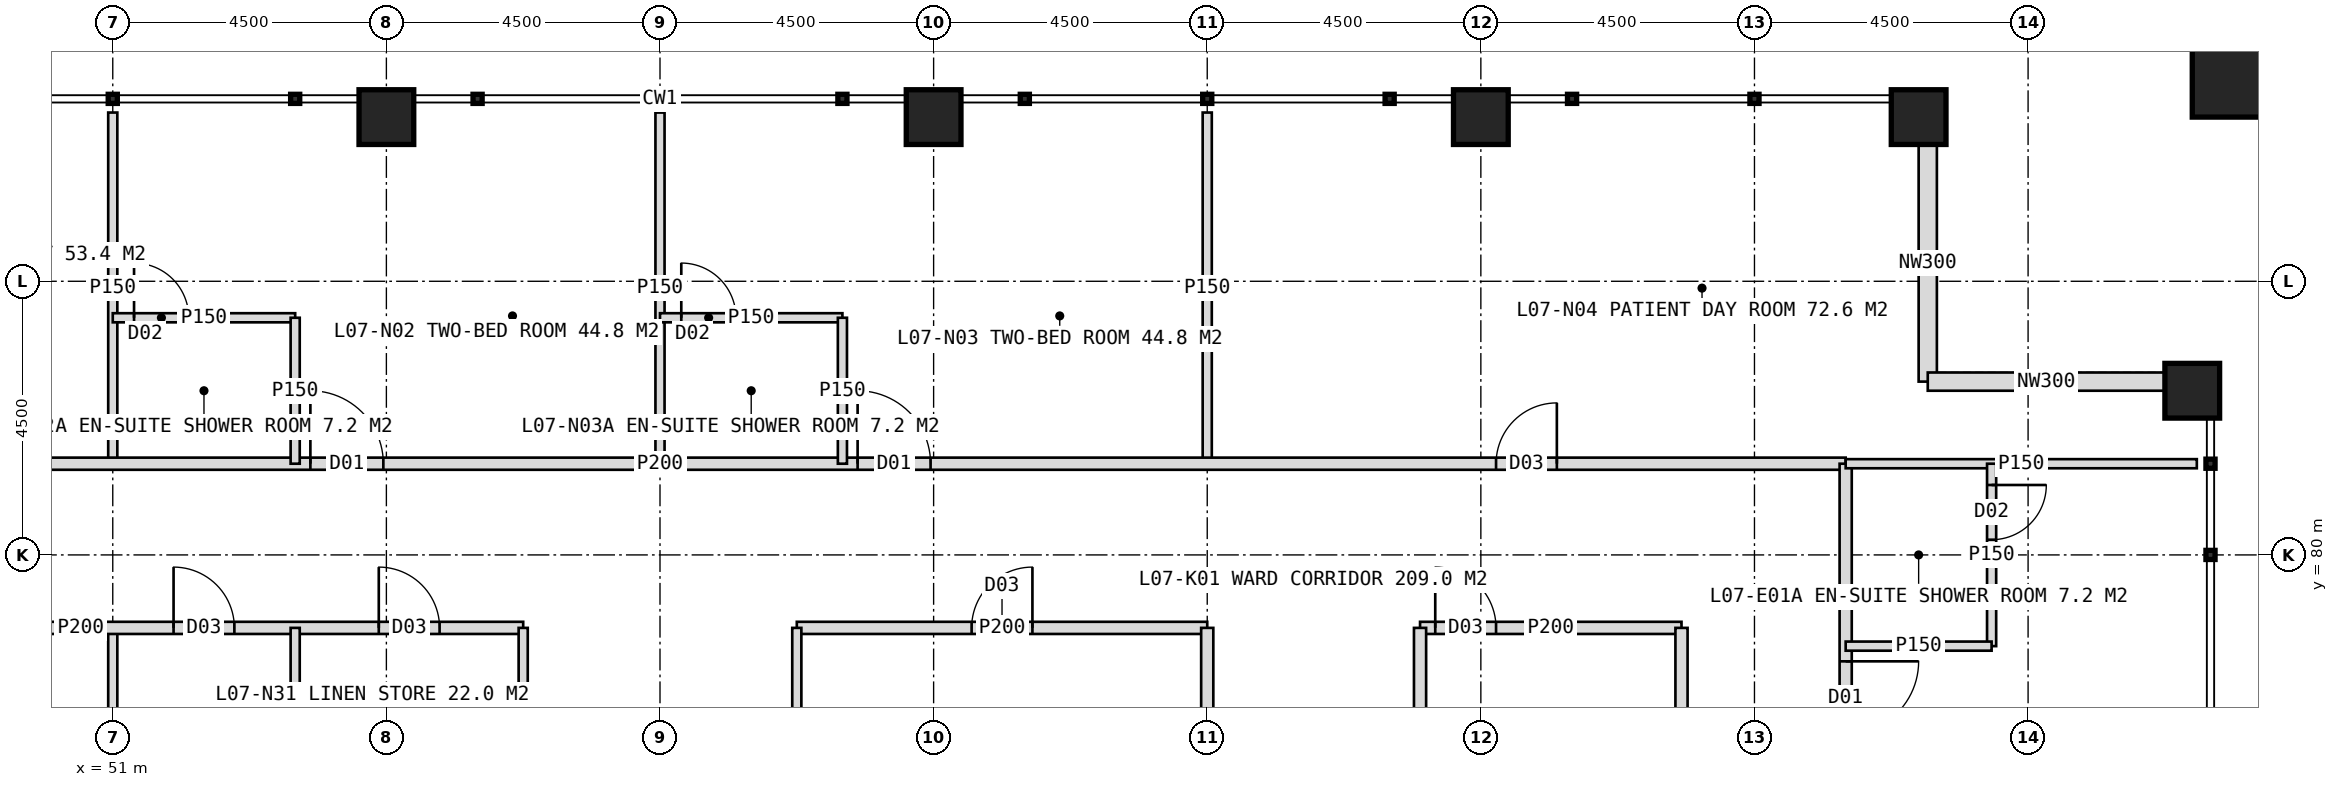
"""IFC4 building model, lengths in metres.
Left out: names, types, materials, properties, quantities, classifications, styles, units other than length and angle.
Written with IfcOpenShell. Run it as: python <this file> out.ifc"""

import sys

from ifc_helpers import new_model, si_unit, direction, frame, frame_2d, origin, origin_2d, place, context, subcontext, project, spatial, rectangle, hollow_rectangle, extrude, element, fill, save


model = new_model("IFC4")
c1 = context("Model", 3, precision=1e-05, world=origin(), true_north=direction((0.0, 1.0)))
c2 = subcontext(c1, "Body", "Model", "MODEL_VIEW")
j1 = project(units=[si_unit("LENGTHUNIT", "METRE"), si_unit("PLANEANGLEUNIT", "RADIAN")], contexts=[c1])
p1 = place(None, origin())
s1 = spatial("IfcSite", under=j1, at=p1, CompositionType="ELEMENT")
p2 = place(p1, origin())
s2 = spatial("IfcBuilding", under=s1, at=p2, CompositionType="ELEMENT")
p3 = place(p2, frame((0.0, 0.0, 35.0)))
s3 = spatial("IfcBuildingStorey", under=s2, at=p3, CompositionType="ELEMENT", Elevation=35.0)
for number, where, z_axis, x_axis in (
    (1, (55.5, 87.2, 0.0), (0.0, 0.0, 1.0), (1.0, 0.0, 0.0)),
    (2, (64.5, 87.2, 0.0), (0.0, 0.0, 1.0), (1.0, 0.0, 0.0)),
    (3, (73.5, 87.2, 0.0), (0.0, 0.0, 1.0), (1.0, 0.0, 0.0)),
    (4, (80.7, 87.2, 0.0), (0.0, 0.0, 1.0), (1.0, 0.0, 0.0)),
    (5, (85.2, 82.7, 0.0), (0.0, 0.0, 1.0), (1.0, 0.0, 0.0)),
):
    element("IfcColumn", number, at=place(p3, frame(where, z_axis=z_axis, x_axis=x_axis)), inside=s3, PredefinedType="COLUMN", context=c2, shape_type="SweptSolid", body=[
        extrude(hollow_rectangle(XDim=0.9, YDim=0.9, WallThickness=0.08, at=origin_2d()), origin(), (0.0, 0.0, 1.0), 4.0),
    ])
p4 = place(p3, frame((86.1, 88.1, 0.0), z_axis=(0.0, 0.0, 1.0), x_axis=(1.0, 0.0, 0.0)))
e6 = element("IfcColumn", 6, at=p4, inside=s3, PredefinedType="COLUMN", context=c2, shape_type="SweptSolid", body=[
    extrude(hollow_rectangle(XDim=1.8, YDim=1.8, WallThickness=0.1, at=origin_2d()), origin(), (0.0, 0.0, 1.0), 4.0),
])
for number, where, z_axis, x_axis in (
    (7, (80.85, 86.75, 0.0), (0.0, 0.0, 1.0), (0.0, -1.0, 0.0)),
    (8, (80.85, 82.85, 0.0), (0.0, 0.0, 1.0), (1.0, 0.0, 0.0)),
):
    element("IfcWall", number, at=place(p3, frame(where, z_axis=z_axis, x_axis=x_axis)), inside=s3, PredefinedType="ELEMENTEDWALL", context=c2, shape_type="SweptSolid", body=[
        extrude(rectangle(XDim=3.9, YDim=0.3, at=frame_2d((1.95, 0.0))), origin(), (0.0, 0.0, 1.0), 2.95),
    ])
p5 = place(p3, frame((51.0, 81.5, 0.0), z_axis=(0.0, 0.0, 1.0), x_axis=(0.0, 1.0, 0.0)))
e9 = element("IfcWall", 9, at=p5, inside=s3, PredefinedType="PARTITIONING", context=c2, shape_type="SweptSolid", body=[
    extrude(rectangle(XDim=5.775, YDim=0.15, at=frame_2d((2.887, 0.0))), origin(), (0.0, 0.0, 1.0), 3.75),
])
p6 = place(p3, frame((60.0, 81.5, 0.0), z_axis=(0.0, 0.0, 1.0), x_axis=(0.0, 1.0, 0.0)))
e10 = element("IfcWall", 10, at=p6, inside=s3, PredefinedType="PARTITIONING", context=c2, shape_type="SweptSolid", body=[
    extrude(rectangle(XDim=5.775, YDim=0.15, at=frame_2d((2.887, 0.0))), origin(), (0.0, 0.0, 1.0), 2.75),
])
p7 = place(p3, frame((69.0, 81.5, 0.0), z_axis=(0.0, 0.0, 1.0), x_axis=(0.0, 1.0, 0.0)))
e11 = element("IfcWall", 11, at=p7, inside=s3, PredefinedType="PARTITIONING", context=c2, shape_type="SweptSolid", body=[
    extrude(rectangle(XDim=5.775, YDim=0.15, at=frame_2d((2.887, 0.0))), origin(), (0.0, 0.0, 1.0), 3.75),
])
p8 = place(p3, frame((40.5, 81.5, 0.0), z_axis=(0.0, 0.0, 1.0), x_axis=(1.0, 0.0, 0.0)))
e12 = element("IfcWall", 12, at=p8, inside=s3, PredefinedType="PARTITIONING", context=c2, shape_type="SweptSolid", body=[
    extrude(rectangle(XDim=39.0, YDim=0.2, at=frame_2d((19.5, 0.0))), origin(), (0.0, 0.0, 1.0), 3.75),
])
p9 = place(p8, frame((3.25, 0.0, 0.0)))
e13 = element("IfcOpeningElement", 13, at=p9, cuts=e12, PredefinedType="OPENING", context=c2, shape_type="SweptSolid", body=[
    extrude(rectangle(XDim=1.2, YDim=2.2, at=frame_2d((0.6, 1.1))), frame((0.0, 0.11, 0.0), z_axis=(0.0, -1.0, 0.0), x_axis=(1.0, 0.0, 0.0)), (0.0, 0.0, 1.0), 0.22),
])
p10 = place(p8, frame((13.75, 0.0, 0.0)))
e14 = element("IfcOpeningElement", 14, at=p10, cuts=e12, PredefinedType="OPENING", context=c2, shape_type="SweptSolid", body=[
    extrude(rectangle(XDim=1.2, YDim=2.2, at=frame_2d((0.6, 1.1))), frame((0.0, 0.11, 0.0), z_axis=(0.0, -1.0, 0.0), x_axis=(1.0, 0.0, 0.0)), (0.0, 0.0, 1.0), 0.22),
])
p11 = place(p8, frame((22.75, 0.0, 0.0)))
e15 = element("IfcOpeningElement", 15, at=p11, cuts=e12, PredefinedType="OPENING", context=c2, shape_type="SweptSolid", body=[
    extrude(rectangle(XDim=1.2, YDim=2.2, at=frame_2d((0.6, 1.1))), frame((0.0, 0.11, 0.0), z_axis=(0.0, -1.0, 0.0), x_axis=(1.0, 0.0, 0.0)), (0.0, 0.0, 1.0), 0.22),
])
p12 = place(p8, frame((33.25, 0.0, 0.0)))
e16 = element("IfcOpeningElement", 16, at=p12, cuts=e12, PredefinedType="OPENING", context=c2, shape_type="SweptSolid", body=[
    extrude(rectangle(XDim=1.0, YDim=2.1, at=frame_2d((0.5, 1.05))), frame((0.0, 0.11, 0.0), z_axis=(0.0, -1.0, 0.0), x_axis=(1.0, 0.0, 0.0)), (0.0, 0.0, 1.0), 0.22),
])
p13 = place(p3, frame((51.0, 83.9, 0.0), z_axis=(0.0, 0.0, 1.0), x_axis=(1.0, 0.0, 0.0)))
e17 = element("IfcWall", 17, at=p13, inside=s3, PredefinedType="PARTITIONING", context=c2, shape_type="SweptSolid", body=[
    extrude(rectangle(XDim=3.0, YDim=0.15, at=frame_2d((1.5, 0.0))), origin(), (0.0, 0.0, 1.0), 3.75),
])
p14 = place(p13, frame((0.35, 0.0, 0.0)))
e18 = element("IfcOpeningElement", 18, at=p14, cuts=e17, PredefinedType="OPENING", context=c2, shape_type="SweptSolid", body=[
    extrude(rectangle(XDim=0.9, YDim=2.1, at=frame_2d((0.45, 1.05))), frame((0.0, 0.085, 0.0), z_axis=(0.0, -1.0, 0.0), x_axis=(1.0, 0.0, 0.0)), (0.0, 0.0, 1.0), 0.17),
])
p15 = place(p3, frame((54.0, 81.5, 0.0), z_axis=(0.0, 0.0, 1.0), x_axis=(0.0, 1.0, 0.0)))
e19 = element("IfcWall", 19, at=p15, inside=s3, PredefinedType="PARTITIONING", context=c2, shape_type="SweptSolid", body=[
    extrude(rectangle(XDim=2.4, YDim=0.15, at=frame_2d((1.2, 0.0))), origin(), (0.0, 0.0, 1.0), 3.75),
])
p16 = place(p3, frame((60.0, 83.9, 0.0), z_axis=(0.0, 0.0, 1.0), x_axis=(1.0, 0.0, 0.0)))
e20 = element("IfcWall", 20, at=p16, inside=s3, PredefinedType="PARTITIONING", context=c2, shape_type="SweptSolid", body=[
    extrude(rectangle(XDim=3.0, YDim=0.15, at=frame_2d((1.5, 0.0))), origin(), (0.0, 0.0, 1.0), 3.75),
])
p17 = place(p16, frame((0.35, 0.0, 0.0)))
e21 = element("IfcOpeningElement", 21, at=p17, cuts=e20, PredefinedType="OPENING", context=c2, shape_type="SweptSolid", body=[
    extrude(rectangle(XDim=0.9, YDim=2.1, at=frame_2d((0.45, 1.05))), frame((0.0, 0.085, 0.0), z_axis=(0.0, -1.0, 0.0), x_axis=(1.0, 0.0, 0.0)), (0.0, 0.0, 1.0), 0.17),
])
p18 = place(p3, frame((63.0, 81.5, 0.0), z_axis=(0.0, 0.0, 1.0), x_axis=(0.0, 1.0, 0.0)))
e22 = element("IfcWall", 22, at=p18, inside=s3, PredefinedType="PARTITIONING", context=c2, shape_type="SweptSolid", body=[
    extrude(rectangle(XDim=2.4, YDim=0.15, at=frame_2d((1.2, 0.0))), origin(), (0.0, 0.0, 1.0), 3.75),
])
p19 = place(p3, frame((51.0, 71.0, 0.0), z_axis=(0.0, 0.0, 1.0), x_axis=(0.0, 1.0, 0.0)))
e23 = element("IfcWall", 23, at=p19, inside=s3, PredefinedType="PARTITIONING", context=c2, shape_type="SweptSolid", body=[
    extrude(rectangle(XDim=7.8, YDim=0.15, at=frame_2d((3.9, 0.0))), origin(), (0.0, 0.0, 1.0), 3.75),
])
p20 = place(p3, frame((43.2, 78.8, 0.0), z_axis=(0.0, 0.0, 1.0), x_axis=(1.0, 0.0, 0.0)))
e24 = element("IfcWall", 24, at=p20, inside=s3, PredefinedType="PARTITIONING", context=c2, shape_type="SweptSolid", body=[
    extrude(rectangle(XDim=14.55, YDim=0.2, at=frame_2d((7.275, 0.0))), origin(), (0.0, 0.0, 1.0), 3.75),
])
p21 = place(p20, frame((8.8, 0.0, 0.0)))
e25 = element("IfcOpeningElement", 25, at=p21, cuts=e24, PredefinedType="OPENING", context=c2, shape_type="SweptSolid", body=[
    extrude(rectangle(XDim=1.0, YDim=2.1, at=frame_2d((0.5, 1.05))), frame((0.0, 0.11, 0.0), z_axis=(0.0, -1.0, 0.0), x_axis=(1.0, 0.0, 0.0)), (0.0, 0.0, 1.0), 0.22),
])
p22 = place(p20, frame((12.175, 0.0, 0.0)))
e26 = element("IfcOpeningElement", 26, at=p22, cuts=e24, PredefinedType="OPENING", context=c2, shape_type="SweptSolid", body=[
    extrude(rectangle(XDim=1.0, YDim=2.1, at=frame_2d((0.5, 1.05))), frame((0.0, 0.11, 0.0), z_axis=(0.0, -1.0, 0.0), x_axis=(1.0, 0.0, 0.0)), (0.0, 0.0, 1.0), 0.22),
])
p23 = place(p3, frame((62.25, 78.8, 0.0), z_axis=(0.0, 0.0, 1.0), x_axis=(1.0, 0.0, 0.0)))
e27 = element("IfcWall", 27, at=p23, inside=s3, PredefinedType="PARTITIONING", context=c2, shape_type="SweptSolid", body=[
    extrude(rectangle(XDim=6.75, YDim=0.2, at=frame_2d((3.375, 0.0))), origin(), (0.0, 0.0, 1.0), 3.75),
])
p24 = place(p23, frame((2.875, 0.0, 0.0)))
e28 = element("IfcOpeningElement", 28, at=p24, cuts=e27, PredefinedType="OPENING", context=c2, shape_type="SweptSolid", body=[
    extrude(rectangle(XDim=1.0, YDim=2.1, at=frame_2d((0.5, 1.05))), frame((0.0, 0.11, 0.0), z_axis=(0.0, -1.0, 0.0), x_axis=(1.0, 0.0, 0.0)), (0.0, 0.0, 1.0), 0.22),
])
p25 = place(p3, frame((72.5, 78.8, 0.0), z_axis=(0.0, 0.0, 1.0), x_axis=(1.0, 0.0, 0.0)))
e29 = element("IfcWall", 29, at=p25, inside=s3, PredefinedType="PARTITIONING", context=c2, shape_type="SweptSolid", body=[
    extrude(rectangle(XDim=4.3, YDim=0.2, at=frame_2d((2.15, 0.0))), origin(), (0.0, 0.0, 1.0), 3.75),
])
p26 = place(p25, frame((0.25, 0.0, 0.0)))
e30 = element("IfcOpeningElement", 30, at=p26, cuts=e29, PredefinedType="OPENING", context=c2, shape_type="SweptSolid", body=[
    extrude(rectangle(XDim=1.0, YDim=2.1, at=frame_2d((0.5, 1.05))), frame((0.0, 0.11, 0.0), z_axis=(0.0, -1.0, 0.0), x_axis=(1.0, 0.0, 0.0)), (0.0, 0.0, 1.0), 0.22),
])
p27 = place(p3, frame((57.75, 71.0, 0.0), z_axis=(0.0, 0.0, 1.0), x_axis=(0.0, 1.0, 0.0)))
e31 = element("IfcWall", 31, at=p27, inside=s3, PredefinedType="PARTITIONING", context=c2, shape_type="SweptSolid", body=[
    extrude(rectangle(XDim=7.8, YDim=0.15, at=frame_2d((3.9, 0.0))), origin(), (0.0, 0.0, 1.0), 3.75),
])
p28 = place(p27, frame((0.6, 0.0, 0.0)))
e32 = element("IfcOpeningElement", 32, at=p28, cuts=e31, PredefinedType="OPENING", context=c2, shape_type="SweptSolid", body=[
    extrude(rectangle(XDim=0.9, YDim=2.1, at=frame_2d((0.45, 1.05))), frame((0.0, 0.085, 0.0), z_axis=(0.0, -1.0, 0.0), x_axis=(1.0, 0.0, 0.0)), (0.0, 0.0, 1.0), 0.17),
])
p29 = place(p3, frame((62.25, 71.0, 0.0), z_axis=(0.0, 0.0, 1.0), x_axis=(0.0, 1.0, 0.0)))
e33 = element("IfcWall", 33, at=p29, inside=s3, PredefinedType="PARTITIONING", context=c2, shape_type="SweptSolid", body=[
    extrude(rectangle(XDim=7.8, YDim=0.15, at=frame_2d((3.9, 0.0))), origin(), (0.0, 0.0, 1.0), 3.75),
])
p30 = place(p29, frame((0.6, 0.0, 0.0)))
e34 = element("IfcOpeningElement", 34, at=p30, cuts=e33, PredefinedType="OPENING", context=c2, shape_type="SweptSolid", body=[
    extrude(rectangle(XDim=0.9, YDim=2.1, at=frame_2d((0.45, 1.05))), frame((0.0, 0.085, 0.0), z_axis=(0.0, -1.0, 0.0), x_axis=(1.0, 0.0, 0.0)), (0.0, 0.0, 1.0), 0.17),
])
p31 = place(p3, frame((54.0, 71.0, 0.0), z_axis=(0.0, 0.0, 1.0), x_axis=(0.0, 1.0, 0.0)))
e35 = element("IfcWall", 35, at=p31, inside=s3, PredefinedType="PARTITIONING", context=c2, shape_type="SweptSolid", body=[
    extrude(rectangle(XDim=7.8, YDim=0.15, at=frame_2d((3.9, 0.0))), origin(), (0.0, 0.0, 1.0), 3.75),
])
p32 = place(p3, frame((79.5, 81.5, 0.0), z_axis=(0.0, 0.0, 1.0), x_axis=(0.0, -1.0, 0.0)))
e36 = element("IfcWall", 36, at=p32, inside=s3, PredefinedType="PARTITIONING", context=c2, shape_type="SweptSolid", body=[
    extrude(rectangle(XDim=39.0, YDim=0.2, at=frame_2d((19.5, 0.0))), origin(), (0.0, 0.0, 1.0), 3.75),
])
p33 = place(p32, frame((3.25, 0.0, 0.0)))
e37 = element("IfcOpeningElement", 37, at=p33, cuts=e36, PredefinedType="OPENING", context=c2, shape_type="SweptSolid", body=[
    extrude(rectangle(XDim=1.2, YDim=2.2, at=frame_2d((0.6, 1.1))), frame((0.0, 0.11, 0.0), z_axis=(0.0, -1.0, 0.0), x_axis=(1.0, 0.0, 0.0)), (0.0, 0.0, 1.0), 0.22),
])
p34 = place(p32, frame((10.15, 0.0, 0.0)))
e38 = element("IfcOpeningElement", 38, at=p34, cuts=e36, PredefinedType="OPENING", context=c2, shape_type="SweptSolid", body=[
    extrude(rectangle(XDim=1.2, YDim=2.2, at=frame_2d((0.6, 1.1))), frame((0.0, 0.11, 0.0), z_axis=(0.0, -1.0, 0.0), x_axis=(1.0, 0.0, 0.0)), (0.0, 0.0, 1.0), 0.22),
])
p35 = place(p32, frame((16.15, 0.0, 0.0)))
e39 = element("IfcOpeningElement", 39, at=p35, cuts=e36, PredefinedType="OPENING", context=c2, shape_type="SweptSolid", body=[
    extrude(rectangle(XDim=1.2, YDim=2.2, at=frame_2d((0.6, 1.1))), frame((0.0, 0.11, 0.0), z_axis=(0.0, -1.0, 0.0), x_axis=(1.0, 0.0, 0.0)), (0.0, 0.0, 1.0), 0.22),
])
p36 = place(p32, frame((22.75, 0.0, 0.0)))
e40 = element("IfcOpeningElement", 40, at=p36, cuts=e36, PredefinedType="OPENING", context=c2, shape_type="SweptSolid", body=[
    extrude(rectangle(XDim=1.2, YDim=2.2, at=frame_2d((0.6, 1.1))), frame((0.0, 0.11, 0.0), z_axis=(0.0, -1.0, 0.0), x_axis=(1.0, 0.0, 0.0)), (0.0, 0.0, 1.0), 0.22),
])
p37 = place(p32, frame((31.15, 0.0, 0.0)))
e41 = element("IfcOpeningElement", 41, at=p37, cuts=e36, PredefinedType="OPENING", context=c2, shape_type="SweptSolid", body=[
    extrude(rectangle(XDim=1.2, YDim=2.2, at=frame_2d((0.6, 1.1))), frame((0.0, 0.11, 0.0), z_axis=(0.0, -1.0, 0.0), x_axis=(1.0, 0.0, 0.0)), (0.0, 0.0, 1.0), 0.22),
])
p38 = place(p3, frame((79.5, 81.5, 0.0), z_axis=(0.0, 0.0, 1.0), x_axis=(1.0, 0.0, 0.0)))
e42 = element("IfcWall", 42, at=p38, inside=s3, PredefinedType="PARTITIONING", context=c2, shape_type="SweptSolid", body=[
    extrude(rectangle(XDim=5.775, YDim=0.15, at=frame_2d((2.887, 0.0))), origin(), (0.0, 0.0, 1.0), 3.75),
])
p39 = place(p3, frame((81.9, 81.5, 0.0), z_axis=(0.0, 0.0, 1.0), x_axis=(0.0, -1.0, 0.0)))
e43 = element("IfcWall", 43, at=p39, inside=s3, PredefinedType="PARTITIONING", context=c2, shape_type="SweptSolid", body=[
    extrude(rectangle(XDim=3.0, YDim=0.15, at=frame_2d((1.5, 0.0))), origin(), (0.0, 0.0, 1.0), 3.75),
])
p40 = place(p39, frame((0.35, 0.0, 0.0)))
e44 = element("IfcOpeningElement", 44, at=p40, cuts=e43, PredefinedType="OPENING", context=c2, shape_type="SweptSolid", body=[
    extrude(rectangle(XDim=0.9, YDim=2.1, at=frame_2d((0.45, 1.05))), frame((0.0, 0.085, 0.0), z_axis=(0.0, -1.0, 0.0), x_axis=(1.0, 0.0, 0.0)), (0.0, 0.0, 1.0), 0.17),
])
p41 = place(p3, frame((79.5, 78.5, 0.0), z_axis=(0.0, 0.0, 1.0), x_axis=(1.0, 0.0, 0.0)))
e45 = element("IfcWall", 45, at=p41, inside=s3, PredefinedType="PARTITIONING", context=c2, shape_type="SweptSolid", body=[
    extrude(rectangle(XDim=2.4, YDim=0.15, at=frame_2d((1.2, 0.0))), origin(), (0.0, 0.0, 1.0), 3.75),
])
p42 = place(p3, frame((76.8, 78.8, 0.0), z_axis=(0.0, 0.0, 1.0), x_axis=(0.0, -1.0, 0.0)))
e46 = element("IfcWall", 46, at=p42, inside=s3, PredefinedType="PARTITIONING", context=c2, shape_type="SweptSolid", body=[
    extrude(rectangle(XDim=12.8, YDim=0.2, at=frame_2d((6.4, 0.0))), origin(), (0.0, 0.0, 1.0), 3.75),
])
p43 = place(p42, frame((9.8, 0.0, 0.0)))
e47 = element("IfcOpeningElement", 47, at=p43, cuts=e46, PredefinedType="OPENING", context=c2, shape_type="SweptSolid", body=[
    extrude(rectangle(XDim=1.0, YDim=2.1, at=frame_2d((0.5, 1.05))), frame((0.0, 0.11, 0.0), z_axis=(0.0, -1.0, 0.0), x_axis=(1.0, 0.0, 0.0)), (0.0, 0.0, 1.0), 0.22),
])
for number, where, z_axis, x_axis in (
    (48, (69.0, 75.1, 0.0), (0.0, 0.0, 1.0), (0.0, 1.0, 0.0)),
    (49, (72.5, 75.1, 0.0), (0.0, 0.0, 1.0), (0.0, 1.0, 0.0)),
):
    element("IfcWall", number, at=place(p3, frame(where, z_axis=z_axis, x_axis=x_axis)), inside=s3, PredefinedType="PARTITIONING", context=c2, shape_type="SweptSolid", body=[
        extrude(rectangle(XDim=3.7, YDim=0.2, at=frame_2d((1.85, 0.0))), origin(), (0.0, 0.0, 1.0), 3.75),
    ])
p44 = place(p10, origin())
e50 = element("IfcDoor", 50, at=p44, inside=s3, OperationType="SINGLE_SWING_LEFT", PredefinedType="DOOR", context=c2, shape_type="SweptSolid", body=[
    extrude(rectangle(XDim=1.2, YDim=2.2, at=frame_2d((0.6, 1.1))), frame((0.0, 0.025, 0.0), z_axis=(0.0, -1.0, 0.0), x_axis=(1.0, 0.0, 0.0)), (0.0, 0.0, 1.0), 0.05),
])
fill(e14, e50)
p45 = place(p14, origin())
e51 = element("IfcDoor", 51, at=p45, inside=s3, OperationType="SINGLE_SWING_LEFT", PredefinedType="DOOR", context=c2, shape_type="SweptSolid", body=[
    extrude(rectangle(XDim=0.9, YDim=2.1, at=frame_2d((0.45, 1.05))), frame((0.0, 0.025, 0.0), z_axis=(0.0, -1.0, 0.0), x_axis=(1.0, 0.0, 0.0)), (0.0, 0.0, 1.0), 0.05),
])
fill(e18, e51)
p46 = place(p11, origin())
e52 = element("IfcDoor", 52, at=p46, inside=s3, OperationType="SINGLE_SWING_LEFT", PredefinedType="DOOR", context=c2, shape_type="SweptSolid", body=[
    extrude(rectangle(XDim=1.2, YDim=2.2, at=frame_2d((0.6, 1.1))), frame((0.0, 0.025, 0.0), z_axis=(0.0, -1.0, 0.0), x_axis=(1.0, 0.0, 0.0)), (0.0, 0.0, 1.0), 0.05),
])
fill(e15, e52)
p47 = place(p17, origin())
e53 = element("IfcDoor", 53, at=p47, inside=s3, OperationType="SINGLE_SWING_LEFT", PredefinedType="DOOR", context=c2, shape_type="SweptSolid", body=[
    extrude(rectangle(XDim=0.9, YDim=2.1, at=frame_2d((0.45, 1.05))), frame((0.0, 0.025, 0.0), z_axis=(0.0, -1.0, 0.0), x_axis=(1.0, 0.0, 0.0)), (0.0, 0.0, 1.0), 0.05),
])
fill(e21, e53)
p48 = place(p12, origin())
e54 = element("IfcDoor", 54, at=p48, inside=s3, OperationType="SINGLE_SWING_RIGHT", PredefinedType="DOOR", context=c2, shape_type="SweptSolid", body=[
    extrude(rectangle(XDim=1.0, YDim=2.1, at=frame_2d((0.5, 1.05))), frame((0.0, 0.025, 0.0), z_axis=(0.0, -1.0, 0.0), x_axis=(1.0, 0.0, 0.0)), (0.0, 0.0, 1.0), 0.05),
])
fill(e16, e54)
p49 = place(p21, origin())
e55 = element("IfcDoor", 55, at=p49, inside=s3, OperationType="SINGLE_SWING_LEFT", PredefinedType="DOOR", context=c2, shape_type="SweptSolid", body=[
    extrude(rectangle(XDim=1.0, YDim=2.1, at=frame_2d((0.5, 1.05))), frame((0.0, 0.025, 0.0), z_axis=(0.0, -1.0, 0.0), x_axis=(1.0, 0.0, 0.0)), (0.0, 0.0, 1.0), 0.05),
])
fill(e25, e55)
p50 = place(p22, origin())
e56 = element("IfcDoor", 56, at=p50, inside=s3, OperationType="SINGLE_SWING_LEFT", PredefinedType="DOOR", context=c2, shape_type="SweptSolid", body=[
    extrude(rectangle(XDim=1.0, YDim=2.1, at=frame_2d((0.5, 1.05))), frame((0.0, 0.025, 0.0), z_axis=(0.0, -1.0, 0.0), x_axis=(1.0, 0.0, 0.0)), (0.0, 0.0, 1.0), 0.05),
])
fill(e26, e56)
p51 = place(p24, origin())
e57 = element("IfcDoor", 57, at=p51, inside=s3, OperationType="SINGLE_SWING_RIGHT", PredefinedType="DOOR", context=c2, shape_type="SweptSolid", body=[
    extrude(rectangle(XDim=1.0, YDim=2.1, at=frame_2d((0.5, 1.05))), frame((0.0, 0.025, 0.0), z_axis=(0.0, -1.0, 0.0), x_axis=(1.0, 0.0, 0.0)), (0.0, 0.0, 1.0), 0.05),
])
fill(e28, e57)
p52 = place(p26, origin())
e58 = element("IfcDoor", 58, at=p52, inside=s3, OperationType="SINGLE_SWING_LEFT", PredefinedType="DOOR", context=c2, shape_type="SweptSolid", body=[
    extrude(rectangle(XDim=1.0, YDim=2.1, at=frame_2d((0.5, 1.05))), frame((0.0, 0.025, 0.0), z_axis=(0.0, -1.0, 0.0), x_axis=(1.0, 0.0, 0.0)), (0.0, 0.0, 1.0), 0.05),
])
fill(e30, e58)
p53 = place(p33, origin())
e59 = element("IfcDoor", 59, at=p53, inside=s3, OperationType="SINGLE_SWING_LEFT", PredefinedType="DOOR", context=c2, shape_type="SweptSolid", body=[
    extrude(rectangle(XDim=1.2, YDim=2.2, at=frame_2d((0.6, 1.1))), frame((0.0, 0.025, 0.0), z_axis=(0.0, -1.0, 0.0), x_axis=(1.0, 0.0, 0.0)), (0.0, 0.0, 1.0), 0.05),
])
fill(e37, e59)
p54 = place(p40, origin())
e60 = element("IfcDoor", 60, at=p54, inside=s3, OperationType="SINGLE_SWING_LEFT", PredefinedType="DOOR", context=c2, shape_type="SweptSolid", body=[
    extrude(rectangle(XDim=0.9, YDim=2.1, at=frame_2d((0.45, 1.05))), frame((0.0, 0.025, 0.0), z_axis=(0.0, -1.0, 0.0), x_axis=(1.0, 0.0, 0.0)), (0.0, 0.0, 1.0), 0.05),
])
fill(e44, e60)
save(model, sys.argv[1])
